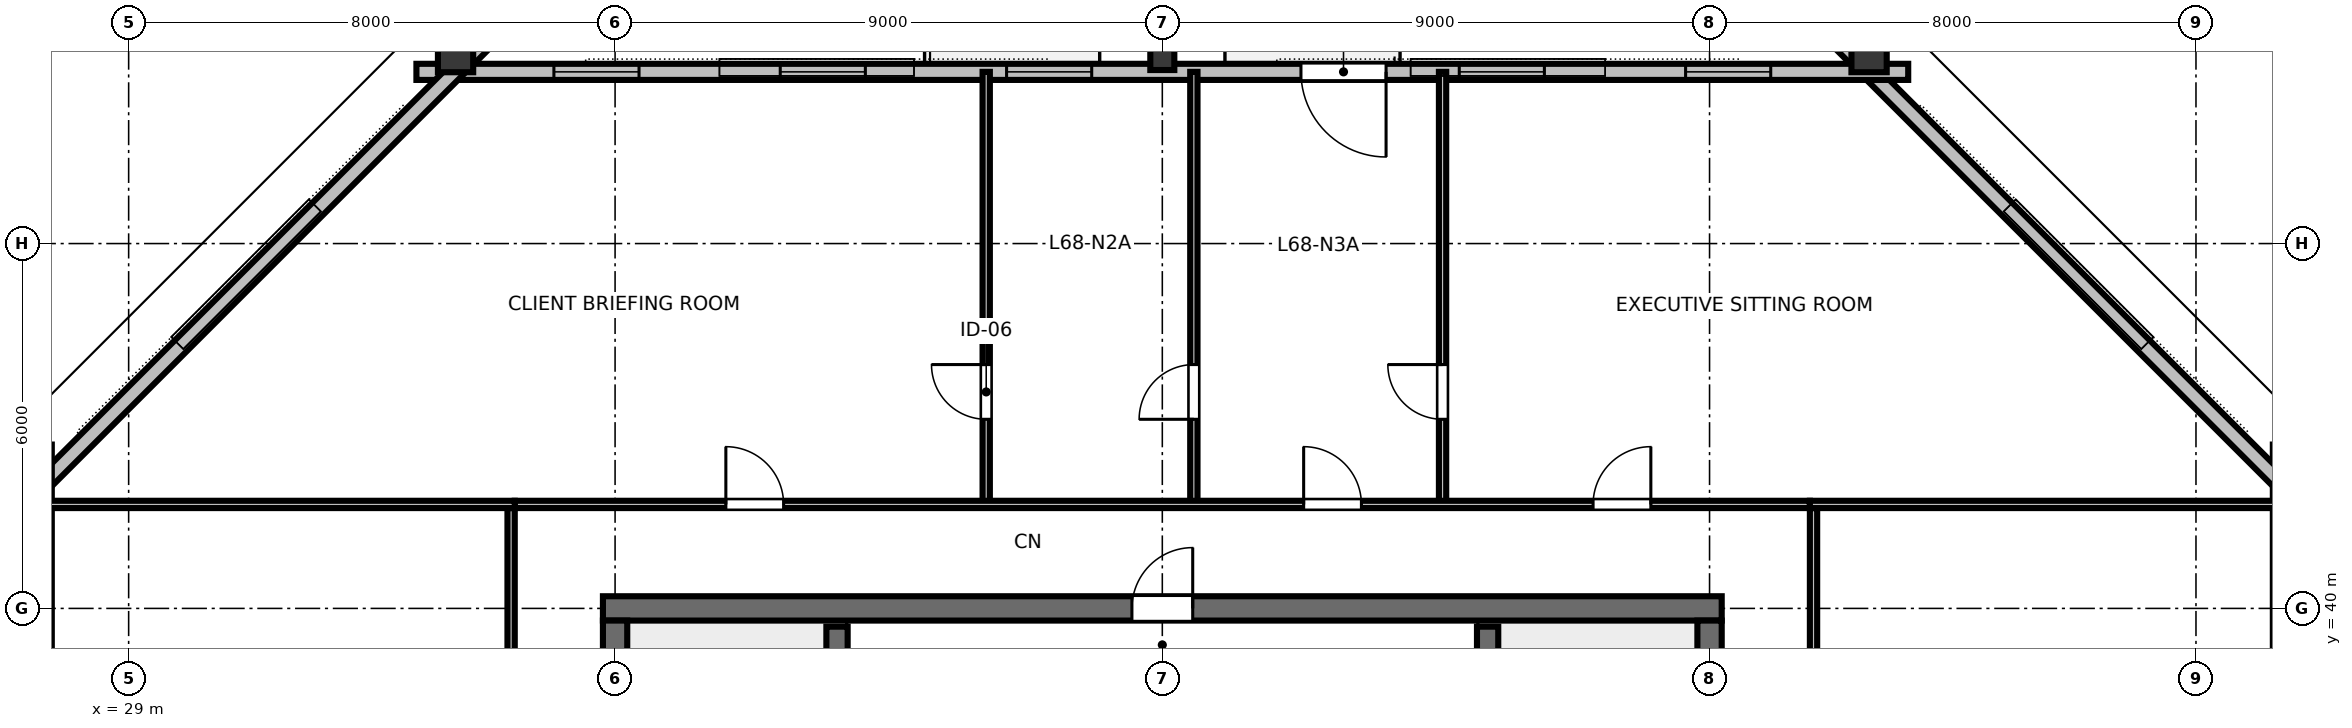
"""IFC4 building model, lengths in metres.
Left out: names, types, materials, properties, quantities, classifications, styles, units other than length and angle.
Written with IfcOpenShell. Run it as: python <this file> out.ifc"""

import sys

from ifc_helpers import new_model, si_unit, direction, frame, frame_2d, origin, origin_2d, place, context, subcontext, project, spatial, rectangle, hollow_rectangle, i_section, extrude, element, fill, save


model = new_model("IFC4")
c1 = context("Model", 3, precision=1e-05, world=origin(), true_north=direction((0.0, 1.0)))
c2 = subcontext(c1, "Body", "Model", "MODEL_VIEW")
j1 = project(units=[si_unit("LENGTHUNIT", "METRE"), si_unit("PLANEANGLEUNIT", "RADIAN")], contexts=[c1])
p1 = place(None, origin())
s1 = spatial("IfcSite", under=j1, at=p1, CompositionType="ELEMENT")
p2 = place(p1, origin())
s2 = spatial("IfcBuilding", under=s1, at=p2, CompositionType="ELEMENT")
p3 = place(p2, frame((0.0, 0.0, 257.4)))
s3 = spatial("IfcBuildingStorey", under=s2, at=p3, CompositionType="ELEMENT", Elevation=257.4)
p4 = place(p3, frame((36.8, 40.0, 0.0), z_axis=(0.0, 0.0, 1.0), x_axis=(1.0, 0.0, 0.0)))
e1 = element("IfcWall", 1, at=p4, inside=s3, PredefinedType="SHEAR", context=c2, shape_type="SweptSolid", body=[
    extrude(rectangle(XDim=18.4, YDim=0.4, at=frame_2d((9.2, 0.0))), origin(), (0.0, 0.0, 1.0), 3.36),
])
p5 = place(p4, frame((8.7, 0.0, 0.0)))
e2 = element("IfcOpeningElement", 2, at=p5, cuts=e1, PredefinedType="OPENING", context=c2, shape_type="SweptSolid", body=[
    extrude(rectangle(XDim=1.0, YDim=2.15, at=frame_2d((0.5, 1.075))), frame((0.0, 0.21, 0.0), z_axis=(0.0, -1.0, 0.0), x_axis=(1.0, 0.0, 0.0)), (0.0, 0.0, 1.0), 0.42),
])
p6 = place(p3, frame((37.0, 24.2, 0.0), z_axis=(0.0, 0.0, 1.0), x_axis=(0.0, 1.0, 0.0)))
e3 = element("IfcWall", 3, at=p6, inside=s3, PredefinedType="SHEAR", context=c2, shape_type="SweptSolid", body=[
    extrude(rectangle(XDim=15.6, YDim=0.4, at=frame_2d((7.8, 0.0))), origin(), (0.0, 0.0, 1.0), 3.36),
])
p7 = place(p6, frame((5.325, 0.0, 0.0)))
e4 = element("IfcOpeningElement", 4, at=p7, cuts=e3, PredefinedType="OPENING", context=c2, shape_type="SweptSolid", body=[
    extrude(rectangle(XDim=1.15, YDim=2.15, at=frame_2d((0.575, 1.075))), frame((0.0, 0.21, 0.0), z_axis=(0.0, -1.0, 0.0), x_axis=(1.0, 0.0, 0.0)), (0.0, 0.0, 1.0), 0.42),
])
p8 = place(p3, frame((55.0, 24.2, 0.0), z_axis=(0.0, 0.0, 1.0), x_axis=(0.0, 1.0, 0.0)))
e5 = element("IfcWall", 5, at=p8, inside=s3, PredefinedType="SHEAR", context=c2, shape_type="SweptSolid", body=[
    extrude(rectangle(XDim=15.6, YDim=0.4, at=frame_2d((7.8, 0.0))), origin(), (0.0, 0.0, 1.0), 3.36),
])
p9 = place(p8, frame((5.325, 0.0, 0.0)))
e6 = element("IfcOpeningElement", 6, at=p9, cuts=e5, PredefinedType="OPENING", context=c2, shape_type="SweptSolid", body=[
    extrude(rectangle(XDim=1.15, YDim=2.15, at=frame_2d((0.575, 1.075))), frame((0.0, 0.21, 0.0), z_axis=(0.0, -1.0, 0.0), x_axis=(1.0, 0.0, 0.0)), (0.0, 0.0, 1.0), 0.42),
])
p10 = place(p3, frame((64.703, 42.112, 0.0), z_axis=(-0.177662325412, -0.155507284832, 0.971727113182), x_axis=(0.731191579458, 0.640009731663, 0.23610679259)))
e7 = element("IfcColumn", 7, at=p10, inside=s3, PredefinedType="COLUMN", context=c2, shape_type="SweptSolid", body=[
    extrude(hollow_rectangle(XDim=0.58, YDim=0.7, WallThickness=0.032, at=origin_2d()), origin(), (0.0, 0.0, 1.0), 3.471),
])
p11 = place(p3, frame((57.624, 49.167, 0.0), z_axis=(-0.204959599513, -0.127485151856, 0.970432428675), x_axis=(0.528166687424, -0.849140712895, 0.0)))
e8 = element("IfcColumn", 8, at=p11, inside=s3, PredefinedType="COLUMN", context=c2, shape_type="SweptSolid", body=[
    extrude(hollow_rectangle(XDim=0.58, YDim=0.7, WallThickness=0.032, at=origin_2d()), origin(), (0.0, 0.0, 1.0), 3.476),
])
p12 = place(p3, frame((46.0, 49.044, 0.0), z_axis=(0.0, -0.128274255688, 0.991738733401), x_axis=(1.0, 0.0, 0.0)))
e9 = element("IfcColumn", 9, at=p12, inside=s3, PredefinedType="COLUMN", context=c2, shape_type="SweptSolid", body=[
    extrude(i_section(OverallWidth=0.395, OverallDepth=0.38, WebThickness=0.019, FlangeThickness=0.03, FilletRadius=0.025, at=origin_2d()), origin(), (0.0, 0.0, 1.0), 3.401),
])
p13 = place(p3, frame((34.376, 49.167, 0.0), z_axis=(0.204959599513, -0.127485151856, 0.970432428675), x_axis=(0.528166687424, 0.849140712895, 0.0)))
e10 = element("IfcColumn", 10, at=p13, inside=s3, PredefinedType="COLUMN", context=c2, shape_type="SweptSolid", body=[
    extrude(hollow_rectangle(XDim=0.58, YDim=0.7, WallThickness=0.032, at=origin_2d()), origin(), (0.0, 0.0, 1.0), 3.476),
])
p14 = place(p3, frame((27.297, 42.112, 0.0), z_axis=(0.177662325412, -0.155507284832, 0.971727113182), x_axis=(-0.731191579458, 0.640009731663, 0.23610679259)))
e11 = element("IfcColumn", 11, at=p14, inside=s3, PredefinedType="COLUMN", context=c2, shape_type="SweptSolid", body=[
    extrude(hollow_rectangle(XDim=0.58, YDim=0.7, WallThickness=0.032, at=origin_2d()), origin(), (0.0, 0.0, 1.0), 3.471),
])
p15 = place(p3, frame((64.841, 41.62, 0.0), z_axis=(0.0, 0.0, 1.0), x_axis=(-0.707106781187, 0.707106781187, 0.0)))
e12 = element("IfcWall", 12, at=p15, inside=s3, PredefinedType="STANDARD", context=c2, shape_type="SweptSolid", body=[
    extrude(rectangle(XDim=10.816, YDim=0.265, at=frame_2d((5.408, 0.0))), origin(), (0.0, 0.0, 1.0), 3.375),
])
p16 = place(p3, frame((58.267, 48.823, 0.0), z_axis=(0.0, 0.0, 1.0), x_axis=(-1.0, 0.0, 0.0)))
e13 = element("IfcWall", 13, at=p16, inside=s3, PredefinedType="STANDARD", context=c2, shape_type="SweptSolid", body=[
    extrude(rectangle(XDim=24.535, YDim=0.265, at=frame_2d((12.267, 0.0))), origin(), (0.0, 0.0, 1.0), 2.832),
])
p17 = place(p16, frame((8.587, 0.0, 0.0)))
e14 = element("IfcOpeningElement", 14, at=p17, cuts=e13, PredefinedType="OPENING", context=c2, shape_type="SweptSolid", body=[
    extrude(rectangle(XDim=1.4, YDim=2.15, at=frame_2d((0.7, 1.075))), frame((0.0, 0.142, 0.0), z_axis=(0.0, -1.0, 0.0), x_axis=(1.0, 0.0, 0.0)), (0.0, 0.0, 1.0), 0.285),
])
p18 = place(p16, frame((2.261, 0.0, 0.85)))
e15 = element("IfcOpeningElement", 15, at=p18, cuts=e13, PredefinedType="OPENING", context=c2, shape_type="SweptSolid", body=[
    extrude(rectangle(XDim=1.4, YDim=1.2, at=frame_2d((0.7, 0.6))), frame((0.0, 0.142, 0.0), z_axis=(0.0, -1.0, 0.0), x_axis=(1.0, 0.0, 0.0)), (0.0, 0.0, 1.0), 0.285),
])
p19 = place(p16, frame((5.984, 0.0, 0.85)))
e16 = element("IfcOpeningElement", 16, at=p19, cuts=e13, PredefinedType="OPENING", context=c2, shape_type="SweptSolid", body=[
    extrude(rectangle(XDim=1.4, YDim=1.2, at=frame_2d((0.7, 0.6))), frame((0.0, 0.142, 0.0), z_axis=(0.0, -1.0, 0.0), x_axis=(1.0, 0.0, 0.0)), (0.0, 0.0, 1.0), 0.285),
])
p20 = place(p16, frame((13.428, 0.0, 0.85)))
e17 = element("IfcOpeningElement", 17, at=p20, cuts=e13, PredefinedType="OPENING", context=c2, shape_type="SweptSolid", body=[
    extrude(rectangle(XDim=1.4, YDim=1.2, at=frame_2d((0.7, 0.6))), frame((0.0, 0.142, 0.0), z_axis=(0.0, -1.0, 0.0), x_axis=(1.0, 0.0, 0.0)), (0.0, 0.0, 1.0), 0.285),
])
p21 = place(p16, frame((17.151, 0.0, 0.85)))
e18 = element("IfcOpeningElement", 18, at=p21, cuts=e13, PredefinedType="OPENING", context=c2, shape_type="SweptSolid", body=[
    extrude(rectangle(XDim=1.4, YDim=1.2, at=frame_2d((0.7, 0.6))), frame((0.0, 0.142, 0.0), z_axis=(0.0, -1.0, 0.0), x_axis=(1.0, 0.0, 0.0)), (0.0, 0.0, 1.0), 0.285),
])
p22 = place(p16, frame((20.873, 0.0, 0.85)))
e19 = element("IfcOpeningElement", 19, at=p22, cuts=e13, PredefinedType="OPENING", context=c2, shape_type="SweptSolid", body=[
    extrude(rectangle(XDim=1.4, YDim=1.2, at=frame_2d((0.7, 0.6))), frame((0.0, 0.142, 0.0), z_axis=(0.0, -1.0, 0.0), x_axis=(1.0, 0.0, 0.0)), (0.0, 0.0, 1.0), 0.285),
])
p23 = place(p3, frame((34.807, 49.269, 0.0), z_axis=(0.0, 0.0, 1.0), x_axis=(-0.707106781187, -0.707106781187, 0.0)))
e20 = element("IfcWall", 20, at=p23, inside=s3, PredefinedType="STANDARD", context=c2, shape_type="SweptSolid", body=[
    extrude(rectangle(XDim=10.816, YDim=0.265, at=frame_2d((5.408, 0.0))), origin(), (0.0, 0.0, 1.0), 3.375),
])
for number, where, z_axis, x_axis in (
    (21, (40.65, 32.0, 0.0), (0.0, 0.0, 1.0), (0.0, 1.0, 0.0)),
    (22, (51.35, 32.0, 0.0), (0.0, 0.0, 1.0), (0.0, 1.0, 0.0)),
):
    element("IfcWall", number, at=place(p3, frame(where, z_axis=z_axis, x_axis=x_axis)), inside=s3, PredefinedType="SHEAR", context=c2, shape_type="SweptSolid", body=[
        extrude(rectangle(XDim=7.7, YDim=0.35, at=frame_2d((3.85, 0.0))), origin(), (0.0, 0.0, 1.0), 3.6),
    ])
p24 = place(p3, frame((43.104, 41.71, 0.0), z_axis=(0.0, 0.0, 1.0), x_axis=(0.0, 1.0, 0.0)))
e23 = element("IfcWall", 23, at=p24, inside=s3, PredefinedType="PARTITIONING", context=c2, shape_type="SweptSolid", body=[
    extrude(rectangle(XDim=7.114, YDim=0.12, at=frame_2d((3.557, 0.0))), origin(), (0.0, 0.0, 1.0), 2.655),
])
p25 = place(p24, frame((1.4, 0.0, 0.0)))
e24 = element("IfcOpeningElement", 24, at=p25, cuts=e23, PredefinedType="OPENING", context=c2, shape_type="SweptSolid", body=[
    extrude(rectangle(XDim=0.9, YDim=2.15, at=frame_2d((0.45, 1.075))), frame((0.0, 0.07, 0.0), z_axis=(0.0, -1.0, 0.0), x_axis=(1.0, 0.0, 0.0)), (0.0, 0.0, 1.0), 0.14),
])
p26 = place(p3, frame((46.519, 41.71, 0.0), z_axis=(0.0, 0.0, 1.0), x_axis=(0.0, 1.0, 0.0)))
e25 = element("IfcWall", 25, at=p26, inside=s3, PredefinedType="PARTITIONING", context=c2, shape_type="SweptSolid", body=[
    extrude(rectangle(XDim=7.114, YDim=0.12, at=frame_2d((3.557, 0.0))), origin(), (0.0, 0.0, 1.0), 2.655),
])
p27 = place(p26, frame((1.4, 0.0, 0.0)))
e26 = element("IfcOpeningElement", 26, at=p27, cuts=e25, PredefinedType="OPENING", context=c2, shape_type="SweptSolid", body=[
    extrude(rectangle(XDim=0.9, YDim=2.15, at=frame_2d((0.45, 1.075))), frame((0.0, 0.07, 0.0), z_axis=(0.0, -1.0, 0.0), x_axis=(1.0, 0.0, 0.0)), (0.0, 0.0, 1.0), 0.14),
])
p28 = place(p3, frame((50.609, 41.71, 0.0), z_axis=(0.0, 0.0, 1.0), x_axis=(0.0, 1.0, 0.0)))
e27 = element("IfcWall", 27, at=p28, inside=s3, PredefinedType="PARTITIONING", context=c2, shape_type="SweptSolid", body=[
    extrude(rectangle(XDim=7.114, YDim=0.12, at=frame_2d((3.557, 0.0))), origin(), (0.0, 0.0, 1.0), 2.655),
])
p29 = place(p28, frame((1.4, 0.0, 0.0)))
e28 = element("IfcOpeningElement", 28, at=p29, cuts=e27, PredefinedType="OPENING", context=c2, shape_type="SweptSolid", body=[
    extrude(rectangle(XDim=0.9, YDim=2.15, at=frame_2d((0.45, 1.075))), frame((0.0, 0.07, 0.0), z_axis=(0.0, -1.0, 0.0), x_axis=(1.0, 0.0, 0.0)), (0.0, 0.0, 1.0), 0.14),
])
p30 = place(p3, frame((35.35, 41.71, 0.0), z_axis=(0.0, 0.0, 1.0), x_axis=(1.0, 0.0, 0.0)))
e29 = element("IfcWall", 29, at=p30, inside=s3, PredefinedType="PARTITIONING", context=c2, shape_type="SweptSolid", body=[
    extrude(rectangle(XDim=21.3, YDim=0.12, at=frame_2d((10.65, 0.0))), origin(), (0.0, 0.0, 1.0), 2.655),
])
p31 = place(p30, frame((3.472, 0.0, 0.0)))
e30 = element("IfcOpeningElement", 30, at=p31, cuts=e29, PredefinedType="OPENING", context=c2, shape_type="SweptSolid", body=[
    extrude(rectangle(XDim=0.95, YDim=2.15, at=frame_2d((0.475, 1.075))), frame((0.0, 0.07, 0.0), z_axis=(0.0, -1.0, 0.0), x_axis=(1.0, 0.0, 0.0)), (0.0, 0.0, 1.0), 0.14),
])
p32 = place(p30, frame((12.975, 0.0, 0.0)))
e31 = element("IfcOpeningElement", 31, at=p32, cuts=e29, PredefinedType="OPENING", context=c2, shape_type="SweptSolid", body=[
    extrude(rectangle(XDim=0.95, YDim=2.15, at=frame_2d((0.475, 1.075))), frame((0.0, 0.07, 0.0), z_axis=(0.0, -1.0, 0.0), x_axis=(1.0, 0.0, 0.0)), (0.0, 0.0, 1.0), 0.14),
])
p33 = place(p30, frame((17.735, 0.0, 0.0)))
e32 = element("IfcOpeningElement", 32, at=p33, cuts=e29, PredefinedType="OPENING", context=c2, shape_type="SweptSolid", body=[
    extrude(rectangle(XDim=0.95, YDim=2.15, at=frame_2d((0.475, 1.075))), frame((0.0, 0.07, 0.0), z_axis=(0.0, -1.0, 0.0), x_axis=(1.0, 0.0, 0.0)), (0.0, 0.0, 1.0), 0.14),
])
p34 = place(p3, frame((35.29, 22.35, 0.0), z_axis=(0.0, 0.0, 1.0), x_axis=(0.0, 1.0, 0.0)))
e33 = element("IfcWall", 33, at=p34, inside=s3, PredefinedType="PARTITIONING", context=c2, shape_type="SweptSolid", body=[
    extrude(rectangle(XDim=19.3, YDim=0.12, at=frame_2d((9.65, 0.0))), origin(), (0.0, 0.0, 1.0), 2.655),
])
p35 = place(p34, frame((3.656, 0.0, 0.0)))
e34 = element("IfcOpeningElement", 34, at=p35, cuts=e33, PredefinedType="OPENING", context=c2, shape_type="SweptSolid", body=[
    extrude(rectangle(XDim=0.95, YDim=2.15, at=frame_2d((0.475, 1.075))), frame((0.0, 0.07, 0.0), z_axis=(0.0, -1.0, 0.0), x_axis=(1.0, 0.0, 0.0)), (0.0, 0.0, 1.0), 0.14),
])
p36 = place(p34, frame((13.106, 0.0, 0.0)))
e35 = element("IfcOpeningElement", 35, at=p36, cuts=e33, PredefinedType="OPENING", context=c2, shape_type="SweptSolid", body=[
    extrude(rectangle(XDim=0.95, YDim=2.15, at=frame_2d((0.475, 1.075))), frame((0.0, 0.07, 0.0), z_axis=(0.0, -1.0, 0.0), x_axis=(1.0, 0.0, 0.0)), (0.0, 0.0, 1.0), 0.14),
])
p37 = place(p3, frame((56.71, 22.35, 0.0), z_axis=(0.0, 0.0, 1.0), x_axis=(0.0, 1.0, 0.0)))
e36 = element("IfcWall", 36, at=p37, inside=s3, PredefinedType="PARTITIONING", context=c2, shape_type="SweptSolid", body=[
    extrude(rectangle(XDim=19.3, YDim=0.12, at=frame_2d((9.65, 0.0))), origin(), (0.0, 0.0, 1.0), 2.655),
])
p38 = place(p37, frame((5.657, 0.0, 0.0)))
e37 = element("IfcOpeningElement", 37, at=p38, cuts=e36, PredefinedType="OPENING", context=c2, shape_type="SweptSolid", body=[
    extrude(rectangle(XDim=0.95, YDim=2.15, at=frame_2d((0.475, 1.075))), frame((0.0, 0.07, 0.0), z_axis=(0.0, -1.0, 0.0), x_axis=(1.0, 0.0, 0.0)), (0.0, 0.0, 1.0), 0.14),
])
p39 = place(p37, frame((15.107, 0.0, 0.0)))
e38 = element("IfcOpeningElement", 38, at=p39, cuts=e36, PredefinedType="OPENING", context=c2, shape_type="SweptSolid", body=[
    extrude(rectangle(XDim=0.95, YDim=2.15, at=frame_2d((0.475, 1.075))), frame((0.0, 0.07, 0.0), z_axis=(0.0, -1.0, 0.0), x_axis=(1.0, 0.0, 0.0)), (0.0, 0.0, 1.0), 0.14),
])
for number, where, z_axis, x_axis in (
    (39, (35.35, 41.71, 0.0), (0.0, 0.0, 1.0), (-1.0, 0.0, 0.0)),
    (40, (56.65, 41.71, 0.0), (0.0, 0.0, 1.0), (1.0, 0.0, 0.0)),
):
    element("IfcWall", number, at=place(p3, frame(where, z_axis=z_axis, x_axis=x_axis)), inside=s3, PredefinedType="PARTITIONING", context=c2, shape_type="SweptSolid", body=[
        extrude(rectangle(XDim=7.747, YDim=0.12, at=frame_2d((3.873, 0.0))), origin(), (0.0, 0.0, 1.0), 2.655),
    ])
p40 = place(p17, origin())
e41 = element("IfcDoor", 41, at=p40, inside=s3, OperationType="SINGLE_SWING_LEFT", PredefinedType="DOOR", context=c2, shape_type="SweptSolid", body=[
    extrude(rectangle(XDim=1.4, YDim=2.15, at=frame_2d((0.7, 1.075))), frame((0.0, 0.025, 0.0), z_axis=(0.0, -1.0, 0.0), x_axis=(1.0, 0.0, 0.0)), (0.0, 0.0, 1.0), 0.05),
])
fill(e14, e41)
p41 = place(p18, origin())
e42 = element("IfcWindow", 42, at=p41, inside=s3, PartitioningType="SINGLE_PANEL", PredefinedType="WINDOW", context=c2, shape_type="SweptSolid", body=[
    extrude(rectangle(XDim=1.4, YDim=1.2, at=frame_2d((0.7, 0.6))), frame((0.0, 0.03, 0.0), z_axis=(0.0, -1.0, 0.0), x_axis=(1.0, 0.0, 0.0)), (0.0, 0.0, 1.0), 0.06),
])
fill(e15, e42)
p42 = place(p19, origin())
e43 = element("IfcWindow", 43, at=p42, inside=s3, PartitioningType="SINGLE_PANEL", PredefinedType="WINDOW", context=c2, shape_type="SweptSolid", body=[
    extrude(rectangle(XDim=1.4, YDim=1.2, at=frame_2d((0.7, 0.6))), frame((0.0, 0.03, 0.0), z_axis=(0.0, -1.0, 0.0), x_axis=(1.0, 0.0, 0.0)), (0.0, 0.0, 1.0), 0.06),
])
fill(e16, e43)
p43 = place(p20, origin())
e44 = element("IfcWindow", 44, at=p43, inside=s3, PartitioningType="SINGLE_PANEL", PredefinedType="WINDOW", context=c2, shape_type="SweptSolid", body=[
    extrude(rectangle(XDim=1.4, YDim=1.2, at=frame_2d((0.7, 0.6))), frame((0.0, 0.03, 0.0), z_axis=(0.0, -1.0, 0.0), x_axis=(1.0, 0.0, 0.0)), (0.0, 0.0, 1.0), 0.06),
])
fill(e17, e44)
p44 = place(p21, origin())
e45 = element("IfcWindow", 45, at=p44, inside=s3, PartitioningType="SINGLE_PANEL", PredefinedType="WINDOW", context=c2, shape_type="SweptSolid", body=[
    extrude(rectangle(XDim=1.4, YDim=1.2, at=frame_2d((0.7, 0.6))), frame((0.0, 0.03, 0.0), z_axis=(0.0, -1.0, 0.0), x_axis=(1.0, 0.0, 0.0)), (0.0, 0.0, 1.0), 0.06),
])
fill(e18, e45)
p45 = place(p22, origin())
e46 = element("IfcWindow", 46, at=p45, inside=s3, PartitioningType="SINGLE_PANEL", PredefinedType="WINDOW", context=c2, shape_type="SweptSolid", body=[
    extrude(rectangle(XDim=1.4, YDim=1.2, at=frame_2d((0.7, 0.6))), frame((0.0, 0.03, 0.0), z_axis=(0.0, -1.0, 0.0), x_axis=(1.0, 0.0, 0.0)), (0.0, 0.0, 1.0), 0.06),
])
fill(e19, e46)
p46 = place(p5, origin())
e47 = element("IfcDoor", 47, at=p46, inside=s3, OperationType="SINGLE_SWING_RIGHT", PredefinedType="DOOR", context=c2, shape_type="SweptSolid", body=[
    extrude(rectangle(XDim=1.0, YDim=2.15, at=frame_2d((0.5, 1.075))), frame((0.0, 0.025, 0.0), z_axis=(0.0, -1.0, 0.0), x_axis=(1.0, 0.0, 0.0)), (0.0, 0.0, 1.0), 0.05),
])
fill(e2, e47)
p47 = place(p25, origin())
e48 = element("IfcDoor", 48, at=p47, inside=s3, OperationType="SINGLE_SWING_RIGHT", PredefinedType="DOOR", context=c2, shape_type="SweptSolid", body=[
    extrude(rectangle(XDim=0.9, YDim=2.15, at=frame_2d((0.45, 1.075))), frame((0.0, 0.025, 0.0), z_axis=(0.0, -1.0, 0.0), x_axis=(1.0, 0.0, 0.0)), (0.0, 0.0, 1.0), 0.05),
])
fill(e24, e48)
p48 = place(p27, origin())
e49 = element("IfcDoor", 49, at=p48, inside=s3, OperationType="SINGLE_SWING_LEFT", PredefinedType="DOOR", context=c2, shape_type="SweptSolid", body=[
    extrude(rectangle(XDim=0.9, YDim=2.15, at=frame_2d((0.45, 1.075))), frame((0.0, 0.025, 0.0), z_axis=(0.0, -1.0, 0.0), x_axis=(1.0, 0.0, 0.0)), (0.0, 0.0, 1.0), 0.05),
])
fill(e26, e49)
p49 = place(p29, origin())
e50 = element("IfcDoor", 50, at=p49, inside=s3, OperationType="SINGLE_SWING_RIGHT", PredefinedType="DOOR", context=c2, shape_type="SweptSolid", body=[
    extrude(rectangle(XDim=0.9, YDim=2.15, at=frame_2d((0.45, 1.075))), frame((0.0, 0.025, 0.0), z_axis=(0.0, -1.0, 0.0), x_axis=(1.0, 0.0, 0.0)), (0.0, 0.0, 1.0), 0.05),
])
fill(e28, e50)
p50 = place(p31, origin())
e51 = element("IfcDoor", 51, at=p50, inside=s3, OperationType="SINGLE_SWING_LEFT", PredefinedType="DOOR", context=c2, shape_type="SweptSolid", body=[
    extrude(rectangle(XDim=0.95, YDim=2.15, at=frame_2d((0.475, 1.075))), frame((0.0, 0.025, 0.0), z_axis=(0.0, -1.0, 0.0), x_axis=(1.0, 0.0, 0.0)), (0.0, 0.0, 1.0), 0.05),
])
fill(e30, e51)
p51 = place(p32, origin())
e52 = element("IfcDoor", 52, at=p51, inside=s3, OperationType="SINGLE_SWING_LEFT", PredefinedType="DOOR", context=c2, shape_type="SweptSolid", body=[
    extrude(rectangle(XDim=0.95, YDim=2.15, at=frame_2d((0.475, 1.075))), frame((0.0, 0.025, 0.0), z_axis=(0.0, -1.0, 0.0), x_axis=(1.0, 0.0, 0.0)), (0.0, 0.0, 1.0), 0.05),
])
fill(e31, e52)
p52 = place(p33, origin())
e53 = element("IfcDoor", 53, at=p52, inside=s3, OperationType="SINGLE_SWING_RIGHT", PredefinedType="DOOR", context=c2, shape_type="SweptSolid", body=[
    extrude(rectangle(XDim=0.95, YDim=2.15, at=frame_2d((0.475, 1.075))), frame((0.0, 0.025, 0.0), z_axis=(0.0, -1.0, 0.0), x_axis=(1.0, 0.0, 0.0)), (0.0, 0.0, 1.0), 0.05),
])
fill(e32, e53)
save(model, sys.argv[1])
